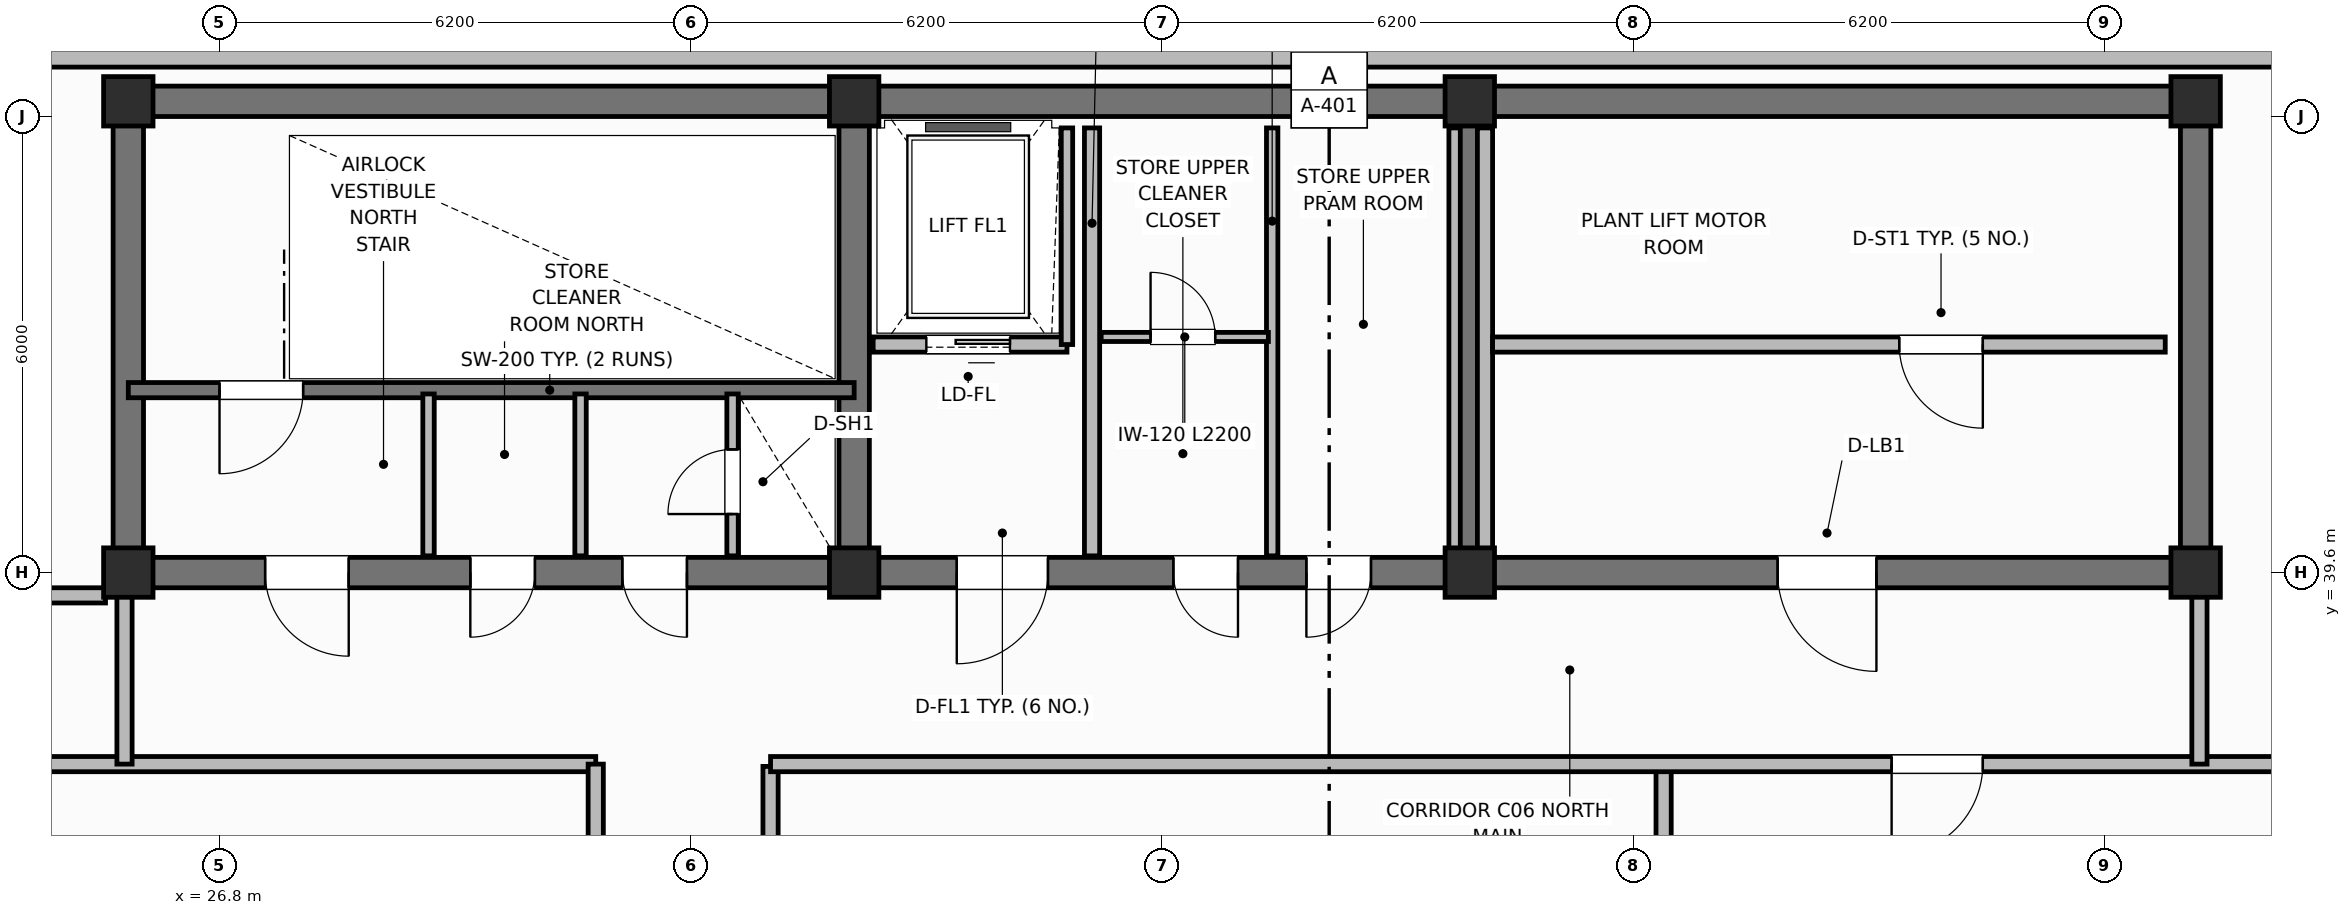
"""IFC4 building model, lengths in metres.
Left out: names, types, materials, properties, quantities, classifications, styles, units other than length and angle.
Written with IfcOpenShell. Run it as: python <this file> out.ifc"""

import sys

from ifc_helpers import new_model, si_unit, direction, frame, frame_2d, origin, origin_2d, place, context, subcontext, project, spatial, rectangle, extrude, element, fill, save


model = new_model("IFC4")
c1 = context("Model", 3, precision=1e-05, world=origin(), true_north=direction((0.0, 1.0)))
c2 = subcontext(c1, "Body", "Model", "MODEL_VIEW")
j1 = project(units=[si_unit("LENGTHUNIT", "METRE"), si_unit("PLANEANGLEUNIT", "RADIAN")], contexts=[c1])
p1 = place(None, origin())
s1 = spatial("IfcSite", under=j1, at=p1, CompositionType="ELEMENT")
p2 = place(p1, origin())
s2 = spatial("IfcBuilding", under=s1, at=p2, CompositionType="ELEMENT")
p3 = place(p2, frame((0.0, 0.0, 320.0)))
s3 = spatial("IfcBuildingStorey", under=s2, at=p3, CompositionType="ELEMENT", Elevation=320.0)
p4 = place(p3, frame((25.6, 45.8, 0.0), z_axis=(0.0, 0.0, 1.0), x_axis=(1.0, 0.0, 0.0)))
e1 = element("IfcWall", 1, at=p4, inside=s3, PredefinedType="SHEAR", context=c2, shape_type="SweptSolid", body=[
    extrude(rectangle(XDim=27.2, YDim=0.4, at=frame_2d((13.6, 0.0))), origin(), (0.0, 0.0, 1.0), 3.6),
])
for number, where, z_axis, x_axis in (
    (2, (25.6, 39.8, 0.0), (0.0, 0.0, 1.0), (0.0, 1.0, 0.0)),
    (3, (52.8, 39.8, 0.0), (0.0, 0.0, 1.0), (0.0, 1.0, 0.0)),
):
    element("IfcWall", number, at=place(p3, frame(where, z_axis=z_axis, x_axis=x_axis)), inside=s3, PredefinedType="SHEAR", context=c2, shape_type="SweptSolid", body=[
        extrude(rectangle(XDim=5.8, YDim=0.4, at=frame_2d((2.9, 0.0))), origin(), (0.0, 0.0, 1.0), 3.6),
    ])
p5 = place(p3, frame((52.8, 39.6, 0.0), z_axis=(0.0, 0.0, 1.0), x_axis=(-1.0, 0.0, 0.0)))
e4 = element("IfcWall", 4, at=p5, inside=s3, PredefinedType="SHEAR", context=c2, shape_type="SweptSolid", body=[
    extrude(rectangle(XDim=27.2, YDim=0.4, at=frame_2d((13.6, 0.0))), origin(), (0.0, 0.0, 1.0), 3.6),
])
p6 = place(p5, frame((24.3, 0.0, 0.0)))
e5 = element("IfcOpeningElement", 5, at=p6, cuts=e4, PredefinedType="OPENING", context=c2, shape_type="SweptSolid", body=[
    extrude(rectangle(XDim=1.1, YDim=2.15, at=frame_2d((0.55, 1.075))), frame((0.0, 0.21, 0.0), z_axis=(0.0, -1.0, 0.0), x_axis=(1.0, 0.0, 0.0)), (0.0, 0.0, 1.0), 0.42),
])
p7 = place(p5, frame((21.85, 0.0, 0.0)))
e6 = element("IfcOpeningElement", 6, at=p7, cuts=e4, PredefinedType="OPENING", context=c2, shape_type="SweptSolid", body=[
    extrude(rectangle(XDim=0.85, YDim=2.1, at=frame_2d((0.425, 1.05))), frame((0.0, 0.21, 0.0), z_axis=(0.0, -1.0, 0.0), x_axis=(1.0, 0.0, 0.0)), (0.0, 0.0, 1.0), 0.42),
])
p8 = place(p5, frame((19.85, 0.0, 0.0)))
e7 = element("IfcOpeningElement", 7, at=p8, cuts=e4, PredefinedType="OPENING", context=c2, shape_type="SweptSolid", body=[
    extrude(rectangle(XDim=0.85, YDim=2.1, at=frame_2d((0.425, 1.05))), frame((0.0, 0.21, 0.0), z_axis=(0.0, -1.0, 0.0), x_axis=(1.0, 0.0, 0.0)), (0.0, 0.0, 1.0), 0.42),
])
p9 = place(p5, frame((15.1, 0.0, 0.0)))
e8 = element("IfcOpeningElement", 8, at=p9, cuts=e4, PredefinedType="OPENING", context=c2, shape_type="SweptSolid", body=[
    extrude(rectangle(XDim=1.2, YDim=2.15, at=frame_2d((0.6, 1.075))), frame((0.0, 0.21, 0.0), z_axis=(0.0, -1.0, 0.0), x_axis=(1.0, 0.0, 0.0)), (0.0, 0.0, 1.0), 0.42),
])
p10 = place(p5, frame((12.6, 0.0, 0.0)))
e9 = element("IfcOpeningElement", 9, at=p10, cuts=e4, PredefinedType="OPENING", context=c2, shape_type="SweptSolid", body=[
    extrude(rectangle(XDim=0.85, YDim=2.1, at=frame_2d((0.425, 1.05))), frame((0.0, 0.21, 0.0), z_axis=(0.0, -1.0, 0.0), x_axis=(1.0, 0.0, 0.0)), (0.0, 0.0, 1.0), 0.42),
])
p11 = place(p5, frame((10.85, 0.0, 0.0)))
e10 = element("IfcOpeningElement", 10, at=p11, cuts=e4, PredefinedType="OPENING", context=c2, shape_type="SweptSolid", body=[
    extrude(rectangle(XDim=0.85, YDim=2.1, at=frame_2d((0.425, 1.05))), frame((0.0, 0.21, 0.0), z_axis=(0.0, -1.0, 0.0), x_axis=(1.0, 0.0, 0.0)), (0.0, 0.0, 1.0), 0.42),
])
p12 = place(p5, frame((4.2, 0.0, 0.0)))
e11 = element("IfcOpeningElement", 11, at=p12, cuts=e4, PredefinedType="OPENING", context=c2, shape_type="SweptSolid", body=[
    extrude(rectangle(XDim=1.3, YDim=2.2, at=frame_2d((0.65, 1.1))), frame((0.0, 0.21, 0.0), z_axis=(0.0, -1.0, 0.0), x_axis=(1.0, 0.0, 0.0)), (0.0, 0.0, 1.0), 0.42),
])
for number, where, z_axis, x_axis in (
    (12, (35.15, 39.8, 0.0), (0.0, 0.0, 1.0), (0.0, 1.0, 0.0)),
    (13, (43.25, 39.8, 0.0), (0.0, 0.0, 1.0), (0.0, 1.0, 0.0)),
):
    element("IfcWall", number, at=place(p3, frame(where, z_axis=z_axis, x_axis=x_axis)), inside=s3, PredefinedType="SHEAR", context=c2, shape_type="SweptSolid", body=[
        extrude(rectangle(XDim=5.8, YDim=0.4, at=frame_2d((2.9, 0.0))), origin(), (0.0, 0.0, 1.0), 3.6),
    ])
for number, where, z_axis, x_axis in (
    (14, (25.6, 39.6, 0.0), (0.0, 0.0, 1.0), (1.0, 0.0, 0.0)),
    (15, (25.6, 45.8, 0.0), (0.0, 0.0, 1.0), (1.0, 0.0, 0.0)),
    (16, (35.15, 39.6, 0.0), (0.0, 0.0, 1.0), (1.0, 0.0, 0.0)),
    (17, (35.15, 45.8, 0.0), (0.0, 0.0, 1.0), (1.0, 0.0, 0.0)),
    (18, (43.25, 39.6, 0.0), (0.0, 0.0, 1.0), (1.0, 0.0, 0.0)),
    (19, (43.25, 45.8, 0.0), (0.0, 0.0, 1.0), (1.0, 0.0, 0.0)),
    (20, (52.8, 39.6, 0.0), (0.0, 0.0, 1.0), (1.0, 0.0, 0.0)),
    (21, (52.8, 45.8, 0.0), (0.0, 0.0, 1.0), (1.0, 0.0, 0.0)),
):
    element("IfcColumn", number, at=place(p3, frame(where, z_axis=z_axis, x_axis=x_axis)), inside=s3, PredefinedType="COLUMN", context=c2, shape_type="SweptSolid", body=[
        extrude(rectangle(XDim=0.65, YDim=0.65, at=origin_2d()), origin(), (0.0, 0.0, 1.0), 3.6),
    ])
p13 = place(p3, frame((54.64, 46.4, 0.0), z_axis=(0.0, 0.0, 1.0), x_axis=(-1.0, 0.0, 0.0)))
e22 = element("IfcWall", 22, at=p13, inside=s3, PredefinedType="SOLIDWALL", context=c2, shape_type="SweptSolid", body=[
    extrude(rectangle(XDim=30.88, YDim=0.3, at=frame_2d((15.44, 0.0))), origin(), (0.0, 0.0, 1.0), 2.83),
])
p14 = place(p3, frame((35.15, 42.0, 0.0), z_axis=(0.0, 0.0, 1.0), x_axis=(-1.0, 0.0, 0.0)))
e23 = element("IfcWall", 23, at=p14, inside=s3, PredefinedType="SHEAR", context=c2, shape_type="SweptSolid", body=[
    extrude(rectangle(XDim=9.55, YDim=0.2, at=frame_2d((4.775, 0.0))), origin(), (0.0, 0.0, 1.0), 3.6),
])
p15 = place(p14, frame((7.25, 0.0, 0.0)))
e24 = element("IfcOpeningElement", 24, at=p15, cuts=e23, PredefinedType="OPENING", context=c2, shape_type="SweptSolid", body=[
    extrude(rectangle(XDim=1.1, YDim=2.15, at=frame_2d((0.55, 1.075))), frame((0.0, 0.11, 0.0), z_axis=(0.0, -1.0, 0.0), x_axis=(1.0, 0.0, 0.0)), (0.0, 0.0, 1.0), 0.22),
])
p16 = place(p3, frame((33.55, 39.82, 0.0), z_axis=(0.0, 0.0, 1.0), x_axis=(0.0, 1.0, 0.0)))
e25 = element("IfcWall", 25, at=p16, inside=s3, PredefinedType="PARTITIONING", context=c2, shape_type="SweptSolid", body=[
    extrude(rectangle(XDim=2.13, YDim=0.15, at=frame_2d((1.065, 0.0))), origin(), (0.0, 0.0, 1.0), 2.53),
])
p17 = place(p16, frame((0.55, 0.0, 0.0)))
e26 = element("IfcOpeningElement", 26, at=p17, cuts=e25, PredefinedType="OPENING", context=c2, shape_type="SweptSolid", body=[
    extrude(rectangle(XDim=0.85, YDim=2.05, at=frame_2d((0.425, 1.025))), frame((0.0, 0.085, 0.0), z_axis=(0.0, -1.0, 0.0), x_axis=(1.0, 0.0, 0.0)), (0.0, 0.0, 1.0), 0.17),
])
for number, where, z_axis, x_axis in (
    (27, (29.55, 39.82, 0.0), (0.0, 0.0, 1.0), (0.0, 1.0, 0.0)),
    (28, (31.55, 39.82, 0.0), (0.0, 0.0, 1.0), (0.0, 1.0, 0.0)),
):
    element("IfcWall", number, at=place(p3, frame(where, z_axis=z_axis, x_axis=x_axis)), inside=s3, PredefinedType="PARTITIONING", context=c2, shape_type="SweptSolid", body=[
        extrude(rectangle(XDim=2.13, YDim=0.15, at=frame_2d((1.065, 0.0))), origin(), (0.0, 0.0, 1.0), 2.53),
    ])
p18 = place(p3, frame((37.95, 42.6, 0.0), z_axis=(0.0, 0.0, 1.0), x_axis=(-1.0, 0.0, 0.0)))
e29 = element("IfcWall", 29, at=p18, inside=s3, PredefinedType="PARTITIONING", context=c2, shape_type="SweptSolid", body=[
    extrude(rectangle(XDim=2.55, YDim=0.2, at=frame_2d((1.275, 0.0))), origin(), (0.0, 0.0, 1.0), 2.19),
])
p19 = place(p18, frame((0.75, 0.0, 0.0)))
e30 = element("IfcOpeningElement", 30, at=p19, cuts=e29, PredefinedType="OPENING", context=c2, shape_type="SweptSolid", body=[
    extrude(rectangle(XDim=1.1, YDim=2.15, at=frame_2d((0.55, 1.075))), frame((0.0, 0.11, 0.0), z_axis=(0.0, -1.0, 0.0), x_axis=(1.0, 0.0, 0.0)), (0.0, 0.0, 1.0), 0.22),
])
p20 = place(p3, frame((37.95, 42.6, 0.0), z_axis=(0.0, 0.0, 1.0), x_axis=(0.0, 1.0, 0.0)))
e31 = element("IfcWall", 31, at=p20, inside=s3, PredefinedType="PARTITIONING", context=c2, shape_type="SweptSolid", body=[
    extrude(rectangle(XDim=2.85, YDim=0.15, at=frame_2d((1.425, 0.0))), origin(), (0.0, 0.0, 1.0), 2.53),
])
p21 = place(p3, frame((38.28, 39.82, 0.0), z_axis=(0.0, 0.0, 1.0), x_axis=(0.0, 1.0, 0.0)))
e32 = element("IfcWall", 32, at=p21, inside=s3, PredefinedType="PARTITIONING", context=c2, shape_type="SweptSolid", body=[
    extrude(rectangle(XDim=5.63, YDim=0.2, at=frame_2d((2.815, 0.0))), origin(), (0.0, 0.0, 1.0), 2.53),
])
for number, where, z_axis, x_axis in (
    (33, (43.05, 39.82, 0.0), (0.0, 0.0, 1.0), (0.0, 1.0, 0.0)),
    (34, (40.65, 39.82, 0.0), (0.0, 0.0, 1.0), (0.0, 1.0, 0.0)),
):
    element("IfcWall", number, at=place(p3, frame(where, z_axis=z_axis, x_axis=x_axis)), inside=s3, PredefinedType="PARTITIONING", context=c2, shape_type="SweptSolid", body=[
        extrude(rectangle(XDim=5.63, YDim=0.15, at=frame_2d((2.815, 0.0))), origin(), (0.0, 0.0, 1.0), 2.53),
    ])
p22 = place(p3, frame((38.4, 42.7, 0.0), z_axis=(0.0, 0.0, 1.0), x_axis=(1.0, 0.0, 0.0)))
e35 = element("IfcWall", 35, at=p22, inside=s3, PredefinedType="PARTITIONING", context=c2, shape_type="SweptSolid", body=[
    extrude(rectangle(XDim=2.2, YDim=0.12, at=frame_2d((1.1, 0.0))), origin(), (0.0, 0.0, 1.0), 2.19),
])
p23 = place(p22, frame((0.65, 0.0, 0.0)))
e36 = element("IfcOpeningElement", 36, at=p23, cuts=e35, PredefinedType="OPENING", context=c2, shape_type="SweptSolid", body=[
    extrude(rectangle(XDim=0.85, YDim=2.1, at=frame_2d((0.425, 1.05))), frame((0.0, 0.07, 0.0), z_axis=(0.0, -1.0, 0.0), x_axis=(1.0, 0.0, 0.0)), (0.0, 0.0, 1.0), 0.14),
])
p24 = place(p3, frame((43.45, 39.82, 0.0), z_axis=(0.0, 0.0, 1.0), x_axis=(0.0, 1.0, 0.0)))
e37 = element("IfcWall", 37, at=p24, inside=s3, PredefinedType="PARTITIONING", context=c2, shape_type="SweptSolid", body=[
    extrude(rectangle(XDim=5.63, YDim=0.2, at=frame_2d((2.815, 0.0))), origin(), (0.0, 0.0, 1.0), 2.53),
])
p25 = place(p3, frame((52.4, 42.6, 0.0), z_axis=(0.0, 0.0, 1.0), x_axis=(-1.0, 0.0, 0.0)))
e38 = element("IfcWall", 38, at=p25, inside=s3, PredefinedType="PARTITIONING", context=c2, shape_type="SweptSolid", body=[
    extrude(rectangle(XDim=8.85, YDim=0.2, at=frame_2d((4.425, 0.0))), origin(), (0.0, 0.0, 1.0), 2.53),
])
p26 = place(p25, frame((2.4, 0.0, 0.0)))
e39 = element("IfcOpeningElement", 39, at=p26, cuts=e38, PredefinedType="OPENING", context=c2, shape_type="SweptSolid", body=[
    extrude(rectangle(XDim=1.1, YDim=2.15, at=frame_2d((0.55, 1.075))), frame((0.0, 0.11, 0.0), z_axis=(0.0, -1.0, 0.0), x_axis=(1.0, 0.0, 0.0)), (0.0, 0.0, 1.0), 0.22),
])
p27 = place(p3, frame((21.53, 37.08, 0.0), z_axis=(0.0, 0.0, 1.0), x_axis=(1.0, 0.0, 0.0)))
e40 = element("IfcWall", 40, at=p27, inside=s3, PredefinedType="PARTITIONING", context=c2, shape_type="SweptSolid", body=[
    extrude(rectangle(XDim=10.22, YDim=0.2, at=frame_2d((5.11, 0.0))), origin(), (0.0, 0.0, 1.0), 2.53),
])
p28 = place(p3, frame((31.75, 19.32, 0.0), z_axis=(0.0, 0.0, 1.0), x_axis=(0.0, 1.0, 0.0)))
e41 = element("IfcWall", 41, at=p28, inside=s3, PredefinedType="PARTITIONING", context=c2, shape_type="SweptSolid", body=[
    extrude(rectangle(XDim=17.76, YDim=0.2, at=frame_2d((8.88, 0.0))), origin(), (0.0, 0.0, 1.0), 2.53),
])
p29 = place(p28, frame((6.0, 0.0, 0.0)))
e42 = element("IfcOpeningElement", 42, at=p29, cuts=e41, PredefinedType="OPENING", context=c2, shape_type="SweptSolid", body=[
    extrude(rectangle(XDim=1.2, YDim=2.15, at=frame_2d((0.6, 1.075))), frame((0.0, 0.11, 0.0), z_axis=(0.0, -1.0, 0.0), x_axis=(1.0, 0.0, 0.0)), (0.0, 0.0, 1.0), 0.22),
])
p30 = place(p3, frame((34.05, 19.35, 0.0), z_axis=(0.0, 0.0, 1.0), x_axis=(0.0, 1.0, 0.0)))
e43 = element("IfcWall", 43, at=p30, inside=s3, PredefinedType="PARTITIONING", context=c2, shape_type="SweptSolid", body=[
    extrude(rectangle(XDim=17.7, YDim=0.2, at=frame_2d((8.85, 0.0))), origin(), (0.0, 0.0, 1.0), 2.53),
])
p31 = place(p30, frame((6.0, 0.0, 0.0)))
e44 = element("IfcOpeningElement", 44, at=p31, cuts=e43, PredefinedType="OPENING", context=c2, shape_type="SweptSolid", body=[
    extrude(rectangle(XDim=1.2, YDim=2.15, at=frame_2d((0.6, 1.075))), frame((0.0, 0.11, 0.0), z_axis=(0.0, -1.0, 0.0), x_axis=(1.0, 0.0, 0.0)), (0.0, 0.0, 1.0), 0.22),
])
p32 = place(p3, frame((45.8, 19.35, 0.0), z_axis=(0.0, 0.0, 1.0), x_axis=(0.0, 1.0, 0.0)))
e45 = element("IfcWall", 45, at=p32, inside=s3, PredefinedType="PARTITIONING", context=c2, shape_type="SweptSolid", body=[
    extrude(rectangle(XDim=17.7, YDim=0.2, at=frame_2d((8.85, 0.0))), origin(), (0.0, 0.0, 1.0), 2.53),
])
p33 = place(p3, frame((56.87, 37.08, 0.0), z_axis=(0.0, 0.0, 1.0), x_axis=(-1.0, 0.0, 0.0)))
e46 = element("IfcWall", 46, at=p33, inside=s3, PredefinedType="PARTITIONING", context=c2, shape_type="SweptSolid", body=[
    extrude(rectangle(XDim=22.82, YDim=0.2, at=frame_2d((11.41, 0.0))), origin(), (0.0, 0.0, 1.0), 2.53),
])
p34 = place(p33, frame((6.87, 0.0, 0.0)))
e47 = element("IfcOpeningElement", 47, at=p34, cuts=e46, PredefinedType="OPENING", context=c2, shape_type="SweptSolid", body=[
    extrude(rectangle(XDim=1.2, YDim=2.15, at=frame_2d((0.6, 1.075))), frame((0.0, 0.11, 0.0), z_axis=(0.0, -1.0, 0.0), x_axis=(1.0, 0.0, 0.0)), (0.0, 0.0, 1.0), 0.22),
])
for number, where, z_axis, x_axis in (
    (48, (52.85, 37.08, 0.0), (0.0, 0.0, 1.0), (0.0, 1.0, 0.0)),
    (49, (25.55, 37.08, 0.0), (0.0, 0.0, 1.0), (0.0, 1.0, 0.0)),
):
    element("IfcWall", number, at=place(p3, frame(where, z_axis=z_axis, x_axis=x_axis)), inside=s3, PredefinedType="PARTITIONING", context=c2, shape_type="SweptSolid", body=[
        extrude(rectangle(XDim=2.37, YDim=0.2, at=frame_2d((1.185, 0.0))), origin(), (0.0, 0.0, 1.0), 2.53),
    ])
p35 = place(p3, frame((21.53, 39.3, 0.0), z_axis=(0.0, 0.0, 1.0), x_axis=(1.0, 0.0, 0.0)))
e50 = element("IfcWall", 50, at=p35, inside=s3, PredefinedType="PARTITIONING", context=c2, shape_type="SweptSolid", body=[
    extrude(rectangle(XDim=3.77, YDim=0.2, at=frame_2d((1.885, 0.0))), origin(), (0.0, 0.0, 1.0), 2.53),
])
p36 = place(p15, origin())
e51 = element("IfcDoor", 51, at=p36, inside=s3, OperationType="SINGLE_SWING_RIGHT", PredefinedType="DOOR", context=c2, shape_type="SweptSolid", body=[
    extrude(rectangle(XDim=1.1, YDim=2.15, at=frame_2d((0.55, 1.075))), frame((0.0, 0.025, 0.0), z_axis=(0.0, -1.0, 0.0), x_axis=(1.0, 0.0, 0.0)), (0.0, 0.0, 1.0), 0.05),
])
fill(e24, e51)
p37 = place(p17, origin())
e52 = element("IfcDoor", 52, at=p37, inside=s3, OperationType="SINGLE_SWING_LEFT", PredefinedType="TRAPDOOR", context=c2, shape_type="SweptSolid", body=[
    extrude(rectangle(XDim=0.85, YDim=2.05, at=frame_2d((0.425, 1.025))), frame((0.0, 0.025, 0.0), z_axis=(0.0, -1.0, 0.0), x_axis=(1.0, 0.0, 0.0)), (0.0, 0.0, 1.0), 0.05),
])
fill(e26, e52)
p38 = place(p19, origin())
e53 = element("IfcDoor", 53, at=p38, inside=s3, OperationType="SLIDING_TO_LEFT", PredefinedType="DOOR", context=c2, shape_type="SweptSolid", body=[
    extrude(rectangle(XDim=1.1, YDim=2.15, at=frame_2d((0.55, 1.075))), frame((0.0, 0.025, 0.0), z_axis=(0.0, -1.0, 0.0), x_axis=(1.0, 0.0, 0.0)), (0.0, 0.0, 1.0), 0.05),
])
fill(e30, e53)
p39 = place(p23, origin())
e54 = element("IfcDoor", 54, at=p39, inside=s3, OperationType="SINGLE_SWING_LEFT", PredefinedType="DOOR", context=c2, shape_type="SweptSolid", body=[
    extrude(rectangle(XDim=0.85, YDim=2.1, at=frame_2d((0.425, 1.05))), frame((0.0, 0.025, 0.0), z_axis=(0.0, -1.0, 0.0), x_axis=(1.0, 0.0, 0.0)), (0.0, 0.0, 1.0), 0.05),
])
fill(e36, e54)
p40 = place(p26, origin())
e55 = element("IfcDoor", 55, at=p40, inside=s3, OperationType="SINGLE_SWING_LEFT", PredefinedType="DOOR", context=c2, shape_type="SweptSolid", body=[
    extrude(rectangle(XDim=1.1, YDim=2.15, at=frame_2d((0.55, 1.075))), frame((0.0, 0.025, 0.0), z_axis=(0.0, -1.0, 0.0), x_axis=(1.0, 0.0, 0.0)), (0.0, 0.0, 1.0), 0.05),
])
fill(e39, e55)
p41 = place(p34, origin())
e56 = element("IfcDoor", 56, at=p41, inside=s3, OperationType="SINGLE_SWING_RIGHT", PredefinedType="DOOR", context=c2, shape_type="SweptSolid", body=[
    extrude(rectangle(XDim=1.2, YDim=2.15, at=frame_2d((0.6, 1.075))), frame((0.0, 0.025, 0.0), z_axis=(0.0, -1.0, 0.0), x_axis=(1.0, 0.0, 0.0)), (0.0, 0.0, 1.0), 0.05),
])
fill(e47, e56)
p42 = place(p6, origin())
e57 = element("IfcDoor", 57, at=p42, inside=s3, OperationType="SINGLE_SWING_LEFT", PredefinedType="DOOR", context=c2, shape_type="SweptSolid", body=[
    extrude(rectangle(XDim=1.1, YDim=2.15, at=frame_2d((0.55, 1.075))), frame((0.0, 0.025, 0.0), z_axis=(0.0, -1.0, 0.0), x_axis=(1.0, 0.0, 0.0)), (0.0, 0.0, 1.0), 0.05),
])
fill(e5, e57)
p43 = place(p7, origin())
e58 = element("IfcDoor", 58, at=p43, inside=s3, OperationType="SINGLE_SWING_RIGHT", PredefinedType="DOOR", context=c2, shape_type="SweptSolid", body=[
    extrude(rectangle(XDim=0.85, YDim=2.1, at=frame_2d((0.425, 1.05))), frame((0.0, 0.025, 0.0), z_axis=(0.0, -1.0, 0.0), x_axis=(1.0, 0.0, 0.0)), (0.0, 0.0, 1.0), 0.05),
])
fill(e6, e58)
p44 = place(p8, origin())
e59 = element("IfcDoor", 59, at=p44, inside=s3, OperationType="SINGLE_SWING_LEFT", PredefinedType="DOOR", context=c2, shape_type="SweptSolid", body=[
    extrude(rectangle(XDim=0.85, YDim=2.1, at=frame_2d((0.425, 1.05))), frame((0.0, 0.025, 0.0), z_axis=(0.0, -1.0, 0.0), x_axis=(1.0, 0.0, 0.0)), (0.0, 0.0, 1.0), 0.05),
])
fill(e7, e59)
p45 = place(p9, origin())
e60 = element("IfcDoor", 60, at=p45, inside=s3, OperationType="SINGLE_SWING_RIGHT", PredefinedType="DOOR", context=c2, shape_type="SweptSolid", body=[
    extrude(rectangle(XDim=1.2, YDim=2.15, at=frame_2d((0.6, 1.075))), frame((0.0, 0.025, 0.0), z_axis=(0.0, -1.0, 0.0), x_axis=(1.0, 0.0, 0.0)), (0.0, 0.0, 1.0), 0.05),
])
fill(e8, e60)
p46 = place(p10, origin())
e61 = element("IfcDoor", 61, at=p46, inside=s3, OperationType="SINGLE_SWING_LEFT", PredefinedType="DOOR", context=c2, shape_type="SweptSolid", body=[
    extrude(rectangle(XDim=0.85, YDim=2.1, at=frame_2d((0.425, 1.05))), frame((0.0, 0.025, 0.0), z_axis=(0.0, -1.0, 0.0), x_axis=(1.0, 0.0, 0.0)), (0.0, 0.0, 1.0), 0.05),
])
fill(e9, e61)
p47 = place(p11, origin())
e62 = element("IfcDoor", 62, at=p47, inside=s3, OperationType="SINGLE_SWING_RIGHT", PredefinedType="DOOR", context=c2, shape_type="SweptSolid", body=[
    extrude(rectangle(XDim=0.85, YDim=2.1, at=frame_2d((0.425, 1.05))), frame((0.0, 0.025, 0.0), z_axis=(0.0, -1.0, 0.0), x_axis=(1.0, 0.0, 0.0)), (0.0, 0.0, 1.0), 0.05),
])
fill(e10, e62)
p48 = place(p12, origin())
e63 = element("IfcDoor", 63, at=p48, inside=s3, OperationType="SINGLE_SWING_LEFT", PredefinedType="DOOR", context=c2, shape_type="SweptSolid", body=[
    extrude(rectangle(XDim=1.3, YDim=2.2, at=frame_2d((0.65, 1.1))), frame((0.0, 0.025, 0.0), z_axis=(0.0, -1.0, 0.0), x_axis=(1.0, 0.0, 0.0)), (0.0, 0.0, 1.0), 0.05),
])
fill(e11, e63)
save(model, sys.argv[1])
